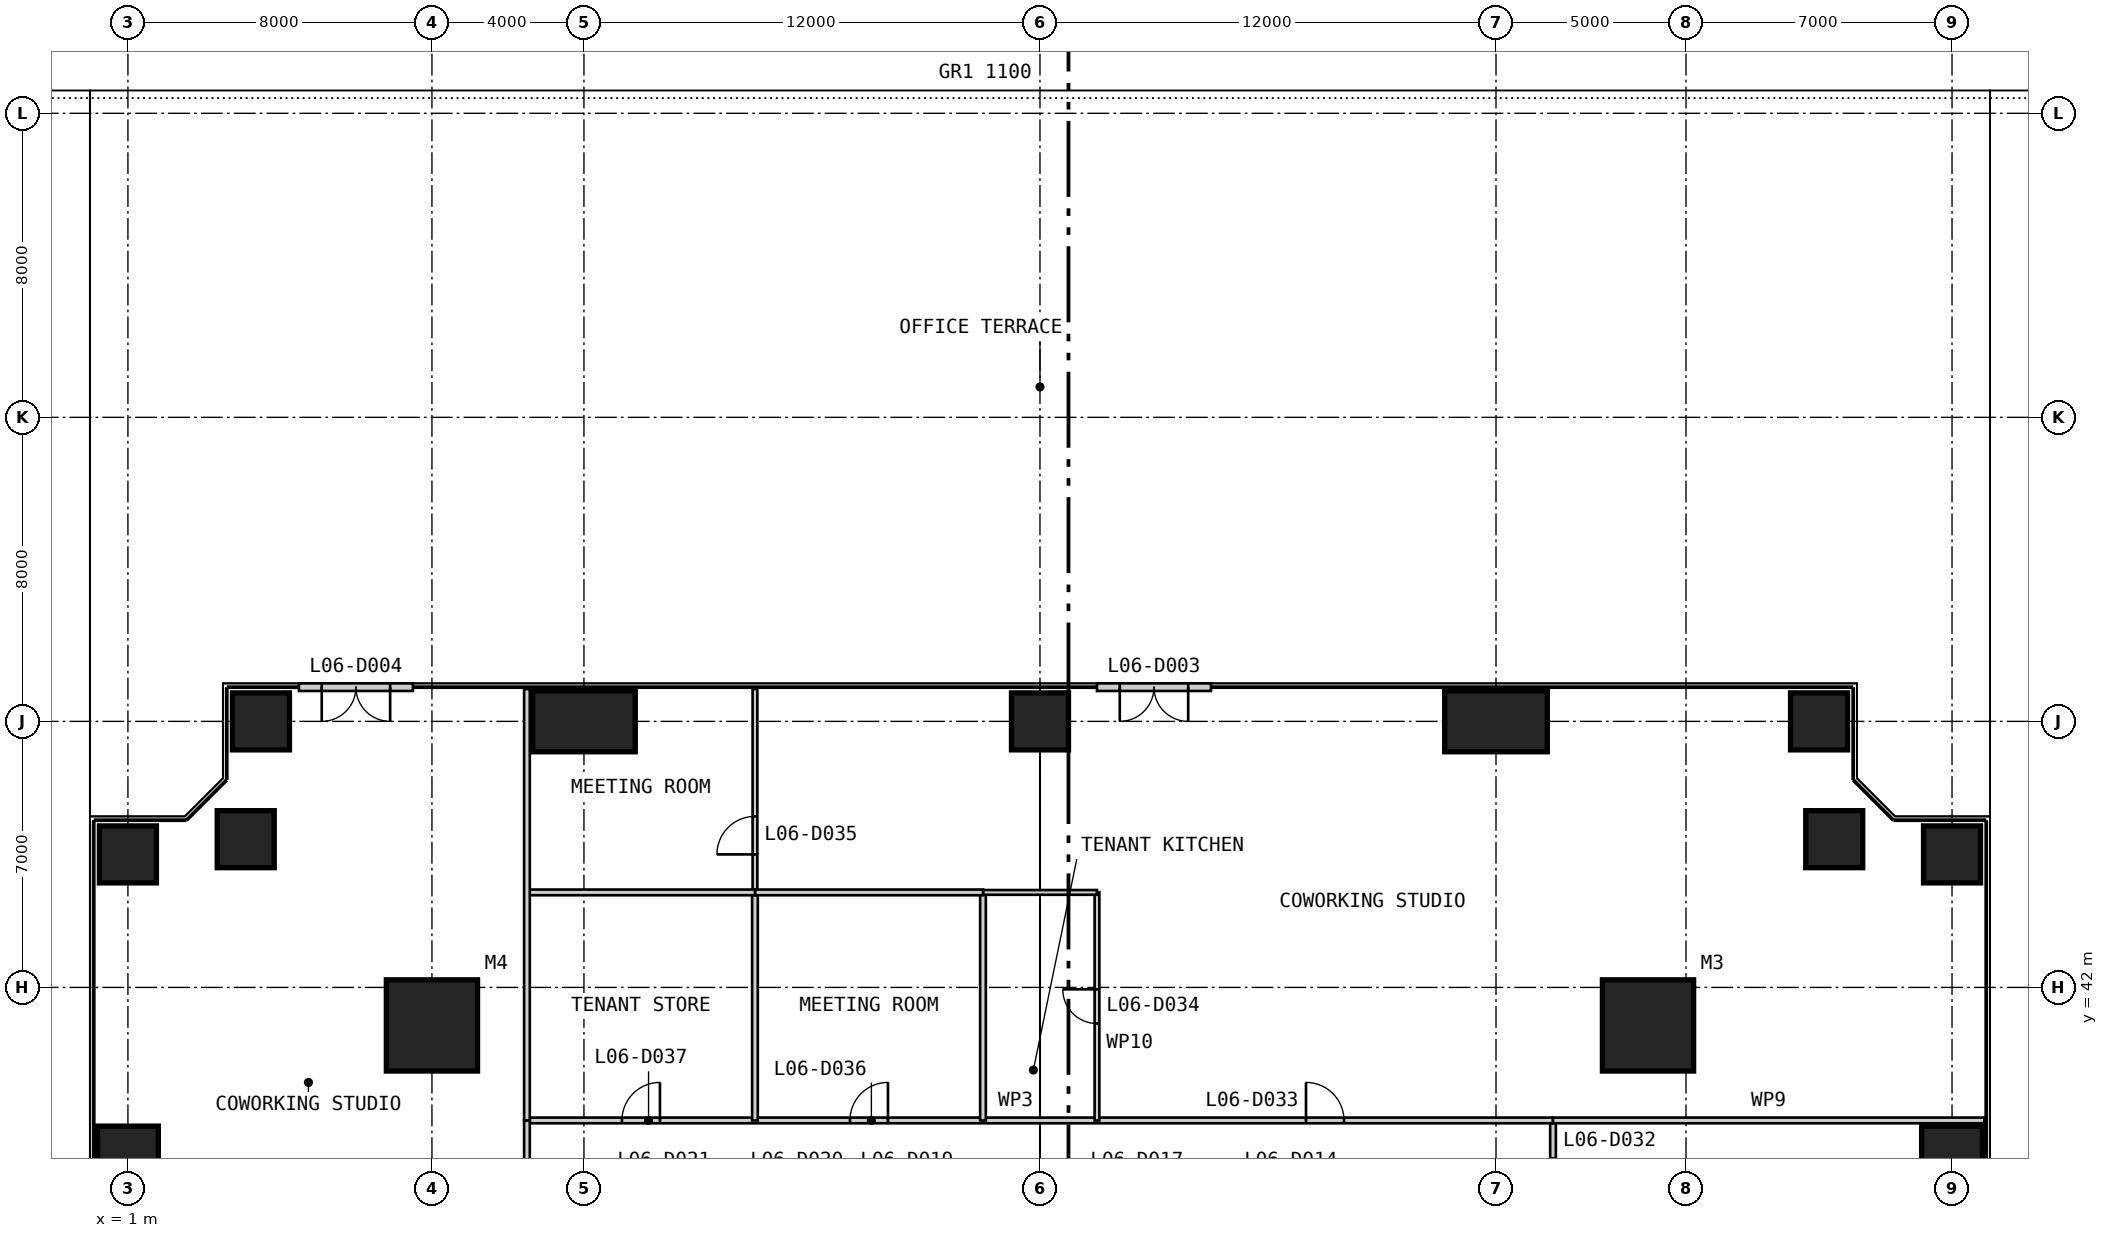
"""IFC4 building model, lengths in metres.
Left out: names, types, materials, properties, quantities, classifications, styles, units other than length and angle.
Written with IfcOpenShell. Run it as: python <this file> out.ifc"""

import sys

from ifc_helpers import new_model, si_unit, direction, frame, frame_2d, origin, origin_2d, place, context, subcontext, project, spatial, rectangle, extrude, element, fill, save


model = new_model("IFC4")
c1 = context("Model", 3, precision=1e-05, world=origin(), true_north=direction((0.0, 1.0)))
c2 = subcontext(c1, "Body", "Model", "MODEL_VIEW")
j1 = project(units=[si_unit("LENGTHUNIT", "METRE"), si_unit("PLANEANGLEUNIT", "RADIAN")], contexts=[c1])
p1 = place(None, origin())
s1 = spatial("IfcSite", under=j1, at=p1, CompositionType="ELEMENT")
p2 = place(p1, origin())
s2 = spatial("IfcBuilding", under=s1, at=p2, CompositionType="ELEMENT")
p3 = place(p2, frame((0.0, 0.0, 31.0)))
s3 = spatial("IfcBuildingStorey", under=s2, at=p3, CompositionType="ELEMENT", Elevation=31.0)
for number, where, z_axis, x_axis in (
    (1, (41.0, 41.0, 0.0), (0.0, 0.0, 1.0), (1.0, 0.0, 0.0)),
    (2, (9.0, 41.0, 0.0), (0.0, 0.0, 1.0), (1.0, 0.0, 0.0)),
):
    element("IfcColumn", number, at=place(p3, frame(where, z_axis=z_axis, x_axis=x_axis)), inside=s3, PredefinedType="COLUMN", context=c2, shape_type="SweptSolid", body=[
        extrude(rectangle(XDim=2.4, YDim=2.4, at=origin_2d()), origin(), (0.0, 0.0, 1.0), 4.0),
    ])
p4 = place(p3, frame((49.0, 37.0, 0.0), z_axis=(0.0, 0.0, 1.0), x_axis=(1.0, 0.0, 0.0)))
e3 = element("IfcColumn", 3, at=p4, inside=s3, PredefinedType="COLUMN", context=c2, shape_type="SweptSolid", body=[
    extrude(rectangle(XDim=1.6, YDim=2.7, at=origin_2d()), origin(), (0.0, 0.0, 1.0), 4.0),
])
for number, where, z_axis, x_axis in (
    (4, (49.0, 45.5, 0.0), (0.0, 0.0, 1.0), (1.0, 0.0, 0.0)),
    (5, (45.9, 45.9, 0.0), (0.0, 0.0, 1.0), (1.0, 0.0, 0.0)),
    (6, (45.5, 49.0, 0.0), (0.0, 0.0, 1.0), (1.0, 0.0, 0.0)),
):
    element("IfcColumn", number, at=place(p3, frame(where, z_axis=z_axis, x_axis=x_axis)), inside=s3, PredefinedType="COLUMN", context=c2, shape_type="SweptSolid", body=[
        extrude(rectangle(XDim=1.5, YDim=1.5, at=origin_2d()), origin(), (0.0, 0.0, 1.0), 4.0),
    ])
p5 = place(p3, frame((37.0, 49.0, 0.0), z_axis=(0.0, 0.0, 1.0), x_axis=(1.0, 0.0, 0.0)))
e7 = element("IfcColumn", 7, at=p5, inside=s3, PredefinedType="COLUMN", context=c2, shape_type="SweptSolid", body=[
    extrude(rectangle(XDim=2.7, YDim=1.6, at=origin_2d()), origin(), (0.0, 0.0, 1.0), 4.0),
])
p6 = place(p3, frame((25.0, 49.0, 0.0), z_axis=(0.0, 0.0, 1.0), x_axis=(1.0, 0.0, 0.0)))
e8 = element("IfcColumn", 8, at=p6, inside=s3, PredefinedType="COLUMN", context=c2, shape_type="SweptSolid", body=[
    extrude(rectangle(XDim=1.5, YDim=1.5, at=origin_2d()), origin(), (0.0, 0.0, 1.0), 4.0),
])
p7 = place(p3, frame((13.0, 49.0, 0.0), z_axis=(0.0, 0.0, 1.0), x_axis=(1.0, 0.0, 0.0)))
e9 = element("IfcColumn", 9, at=p7, inside=s3, PredefinedType="COLUMN", context=c2, shape_type="SweptSolid", body=[
    extrude(rectangle(XDim=2.7, YDim=1.6, at=origin_2d()), origin(), (0.0, 0.0, 1.0), 4.0),
])
for number, where, z_axis, x_axis in (
    (10, (4.5, 49.0, 0.0), (0.0, 0.0, 1.0), (1.0, 0.0, 0.0)),
    (11, (4.1, 45.9, 0.0), (0.0, 0.0, 1.0), (1.0, 0.0, 0.0)),
    (12, (1.0, 45.5, 0.0), (0.0, 0.0, 1.0), (1.0, 0.0, 0.0)),
):
    element("IfcColumn", number, at=place(p3, frame(where, z_axis=z_axis, x_axis=x_axis)), inside=s3, PredefinedType="COLUMN", context=c2, shape_type="SweptSolid", body=[
        extrude(rectangle(XDim=1.5, YDim=1.5, at=origin_2d()), origin(), (0.0, 0.0, 1.0), 4.0),
    ])
p8 = place(p3, frame((1.0, 37.0, 0.0), z_axis=(0.0, 0.0, 1.0), x_axis=(1.0, 0.0, 0.0)))
e13 = element("IfcColumn", 13, at=p8, inside=s3, PredefinedType="COLUMN", context=c2, shape_type="SweptSolid", body=[
    extrude(rectangle(XDim=1.6, YDim=2.7, at=origin_2d()), origin(), (0.0, 0.0, 1.0), 4.0),
])
p9 = place(p3, frame((29.5, 49.9, 0.0), z_axis=(0.0, 0.0, 1.0), x_axis=(-1.0, 0.0, 0.0)))
e14 = element("IfcWall", 14, at=p9, inside=s3, PredefinedType="SOLIDWALL", context=c2, shape_type="SweptSolid", body=[
    extrude(rectangle(XDim=3.0, YDim=0.2, at=frame_2d((1.5, 0.0))), origin(), (0.0, 0.0, 1.0), 3.85),
])
p10 = place(p9, frame((0.6, 0.0, 0.0)))
e15 = element("IfcOpeningElement", 15, at=p10, cuts=e14, PredefinedType="OPENING", context=c2, shape_type="SweptSolid", body=[
    extrude(rectangle(XDim=1.8, YDim=2.4, at=frame_2d((0.9, 1.2))), frame((0.0, 0.11, 0.0), z_axis=(0.0, -1.0, 0.0), x_axis=(1.0, 0.0, 0.0)), (0.0, 0.0, 1.0), 0.22),
])
p11 = place(p3, frame((8.5, 49.9, 0.0), z_axis=(0.0, 0.0, 1.0), x_axis=(-1.0, 0.0, 0.0)))
e16 = element("IfcWall", 16, at=p11, inside=s3, PredefinedType="SOLIDWALL", context=c2, shape_type="SweptSolid", body=[
    extrude(rectangle(XDim=3.0, YDim=0.2, at=frame_2d((1.5, 0.0))), origin(), (0.0, 0.0, 1.0), 3.85),
])
p12 = place(p11, frame((0.6, 0.0, 0.0)))
e17 = element("IfcOpeningElement", 17, at=p12, cuts=e16, PredefinedType="OPENING", context=c2, shape_type="SweptSolid", body=[
    extrude(rectangle(XDim=1.8, YDim=2.4, at=frame_2d((0.9, 1.2))), frame((0.0, 0.11, 0.0), z_axis=(0.0, -1.0, 0.0), x_axis=(1.0, 0.0, 0.0)), (0.0, 0.0, 1.0), 0.22),
])
p13 = place(p3, frame((38.5, 11.5, 0.0), z_axis=(0.0, 0.0, 1.0), x_axis=(0.0, 1.0, 0.0)))
e18 = element("IfcWall", 18, at=p13, inside=s3, PredefinedType="PARTITIONING", context=c2, shape_type="SweptSolid", body=[
    extrude(rectangle(XDim=27.0, YDim=0.15, at=frame_2d((13.5, 0.0))), origin(), (0.0, 0.0, 1.0), 3.85),
])
p14 = place(p13, frame((2.5, 0.0, 0.0)))
e19 = element("IfcOpeningElement", 19, at=p14, cuts=e18, PredefinedType="OPENING", context=c2, shape_type="SweptSolid", body=[
    extrude(rectangle(XDim=1.0, YDim=2.2, at=frame_2d((0.5, 1.1))), frame((0.0, 0.085, 0.0), z_axis=(0.0, -1.0, 0.0), x_axis=(1.0, 0.0, 0.0)), (0.0, 0.0, 1.0), 0.17),
])
p15 = place(p13, frame((11.5, 0.0, 0.0)))
e20 = element("IfcOpeningElement", 20, at=p15, cuts=e18, PredefinedType="OPENING", context=c2, shape_type="SweptSolid", body=[
    extrude(rectangle(XDim=1.0, YDim=2.2, at=frame_2d((0.5, 1.1))), frame((0.0, 0.085, 0.0), z_axis=(0.0, -1.0, 0.0), x_axis=(1.0, 0.0, 0.0)), (0.0, 0.0, 1.0), 0.17),
])
p16 = place(p13, frame((17.5, 0.0, 0.0)))
e21 = element("IfcOpeningElement", 21, at=p16, cuts=e18, PredefinedType="OPENING", context=c2, shape_type="SweptSolid", body=[
    extrude(rectangle(XDim=1.0, YDim=2.2, at=frame_2d((0.5, 1.1))), frame((0.0, 0.085, 0.0), z_axis=(0.0, -1.0, 0.0), x_axis=(1.0, 0.0, 0.0)), (0.0, 0.0, 1.0), 0.17),
])
p17 = place(p13, frame((22.0, 0.0, 0.0)))
e22 = element("IfcOpeningElement", 22, at=p17, cuts=e18, PredefinedType="OPENING", context=c2, shape_type="SweptSolid", body=[
    extrude(rectangle(XDim=1.0, YDim=2.2, at=frame_2d((0.5, 1.1))), frame((0.0, 0.085, 0.0), z_axis=(0.0, -1.0, 0.0), x_axis=(1.0, 0.0, 0.0)), (0.0, 0.0, 1.0), 0.17),
])
p18 = place(p13, frame((25.0, 0.0, 0.0)))
e23 = element("IfcOpeningElement", 23, at=p18, cuts=e18, PredefinedType="OPENING", context=c2, shape_type="SweptSolid", body=[
    extrude(rectangle(XDim=1.0, YDim=2.2, at=frame_2d((0.5, 1.1))), frame((0.0, 0.085, 0.0), z_axis=(0.0, -1.0, 0.0), x_axis=(1.0, 0.0, 0.0)), (0.0, 0.0, 1.0), 0.17),
])
p19 = place(p3, frame((38.5, 38.5, 0.0), z_axis=(0.0, 0.0, 1.0), x_axis=(-1.0, 0.0, 0.0)))
e24 = element("IfcWall", 24, at=p19, inside=s3, PredefinedType="PARTITIONING", context=c2, shape_type="SweptSolid", body=[
    extrude(rectangle(XDim=27.0, YDim=0.15, at=frame_2d((13.5, 0.0))), origin(), (0.0, 0.0, 1.0), 3.85),
])
p20 = place(p19, frame((5.5, 0.0, 0.0)))
e25 = element("IfcOpeningElement", 25, at=p20, cuts=e24, PredefinedType="OPENING", context=c2, shape_type="SweptSolid", body=[
    extrude(rectangle(XDim=1.0, YDim=2.2, at=frame_2d((0.5, 1.1))), frame((0.0, 0.085, 0.0), z_axis=(0.0, -1.0, 0.0), x_axis=(1.0, 0.0, 0.0)), (0.0, 0.0, 1.0), 0.17),
])
p21 = place(p19, frame((17.5, 0.0, 0.0)))
e26 = element("IfcOpeningElement", 26, at=p21, cuts=e24, PredefinedType="OPENING", context=c2, shape_type="SweptSolid", body=[
    extrude(rectangle(XDim=1.0, YDim=2.2, at=frame_2d((0.5, 1.1))), frame((0.0, 0.085, 0.0), z_axis=(0.0, -1.0, 0.0), x_axis=(1.0, 0.0, 0.0)), (0.0, 0.0, 1.0), 0.17),
])
p22 = place(p19, frame((23.5, 0.0, 0.0)))
e27 = element("IfcOpeningElement", 27, at=p22, cuts=e24, PredefinedType="OPENING", context=c2, shape_type="SweptSolid", body=[
    extrude(rectangle(XDim=1.0, YDim=2.2, at=frame_2d((0.5, 1.1))), frame((0.0, 0.085, 0.0), z_axis=(0.0, -1.0, 0.0), x_axis=(1.0, 0.0, 0.0)), (0.0, 0.0, 1.0), 0.17),
])
p23 = place(p3, frame((49.85, 38.5, 0.0), z_axis=(0.0, 0.0, 1.0), x_axis=(-1.0, 0.0, 0.0)))
e28 = element("IfcWall", 28, at=p23, inside=s3, PredefinedType="PARTITIONING", context=c2, shape_type="SweptSolid", body=[
    extrude(rectangle(XDim=11.35, YDim=0.15, at=frame_2d((5.675, 0.0))), origin(), (0.0, 0.0, 1.0), 3.85),
])
p24 = place(p3, frame((26.5, 44.5, 0.0), z_axis=(0.0, 0.0, 1.0), x_axis=(0.0, -1.0, 0.0)))
e29 = element("IfcWall", 29, at=p24, inside=s3, PredefinedType="PARTITIONING", context=c2, shape_type="SweptSolid", body=[
    extrude(rectangle(XDim=6.0, YDim=0.125, at=frame_2d((3.0, 0.0))), origin(), (0.0, 0.0, 1.0), 3.85),
])
p25 = place(p24, frame((2.55, 0.0, 0.0)))
e30 = element("IfcOpeningElement", 30, at=p25, cuts=e29, PredefinedType="OPENING", context=c2, shape_type="SweptSolid", body=[
    extrude(rectangle(XDim=0.9, YDim=2.2, at=frame_2d((0.45, 1.1))), frame((0.0, 0.073, 0.0), z_axis=(0.0, -1.0, 0.0), x_axis=(1.0, 0.0, 0.0)), (0.0, 0.0, 1.0), 0.145),
])
p26 = place(p3, frame((23.5, 44.5, 0.0), z_axis=(0.0, 0.0, 1.0), x_axis=(0.0, -1.0, 0.0)))
e31 = element("IfcWall", 31, at=p26, inside=s3, PredefinedType="PARTITIONING", context=c2, shape_type="SweptSolid", body=[
    extrude(rectangle(XDim=6.0, YDim=0.15, at=frame_2d((3.0, 0.0))), origin(), (0.0, 0.0, 1.0), 3.85),
])
p27 = place(p3, frame((17.5, 49.85, 0.0), z_axis=(0.0, 0.0, 1.0), x_axis=(0.0, -1.0, 0.0)))
e32 = element("IfcWall", 32, at=p27, inside=s3, PredefinedType="PARTITIONING", context=c2, shape_type="SweptSolid", body=[
    extrude(rectangle(XDim=5.35, YDim=0.125, at=frame_2d((2.675, 0.0))), origin(), (0.0, 0.0, 1.0), 3.85),
])
p28 = place(p27, frame((3.35, 0.0, 0.0)))
e33 = element("IfcOpeningElement", 33, at=p28, cuts=e32, PredefinedType="OPENING", context=c2, shape_type="SweptSolid", body=[
    extrude(rectangle(XDim=1.0, YDim=2.2, at=frame_2d((0.5, 1.1))), frame((0.0, 0.073, 0.0), z_axis=(0.0, -1.0, 0.0), x_axis=(1.0, 0.0, 0.0)), (0.0, 0.0, 1.0), 0.145),
])
p29 = place(p3, frame((17.5, 44.5, 0.0), z_axis=(0.0, 0.0, 1.0), x_axis=(0.0, -1.0, 0.0)))
e34 = element("IfcWall", 34, at=p29, inside=s3, PredefinedType="PARTITIONING", context=c2, shape_type="SweptSolid", body=[
    extrude(rectangle(XDim=6.0, YDim=0.15, at=frame_2d((3.0, 0.0))), origin(), (0.0, 0.0, 1.0), 3.85),
])
p30 = place(p3, frame((26.5, 44.5, 0.0), z_axis=(0.0, 0.0, 1.0), x_axis=(-1.0, 0.0, 0.0)))
e35 = element("IfcWall", 35, at=p30, inside=s3, PredefinedType="PARTITIONING", context=c2, shape_type="SweptSolid", body=[
    extrude(rectangle(XDim=3.0, YDim=0.125, at=frame_2d((1.5, 0.0))), origin(), (0.0, 0.0, 1.0), 3.85),
])
for number, where, z_axis, x_axis in (
    (36, (23.5, 44.5, 0.0), (0.0, 0.0, 1.0), (-1.0, 0.0, 0.0)),
    (37, (17.5, 44.5, 0.0), (0.0, 0.0, 1.0), (-1.0, 0.0, 0.0)),
):
    element("IfcWall", number, at=place(p3, frame(where, z_axis=z_axis, x_axis=x_axis)), inside=s3, PredefinedType="PARTITIONING", context=c2, shape_type="SweptSolid", body=[
        extrude(rectangle(XDim=6.0, YDim=0.15, at=frame_2d((3.0, 0.0))), origin(), (0.0, 0.0, 1.0), 3.85),
    ])
p31 = place(p3, frame((11.5, 38.5, 0.0), z_axis=(0.0, 0.0, 1.0), x_axis=(0.0, -1.0, 0.0)))
e38 = element("IfcWall", 38, at=p31, inside=s3, PredefinedType="PARTITIONING", context=c2, shape_type="SweptSolid", body=[
    extrude(rectangle(XDim=27.0, YDim=0.15, at=frame_2d((13.5, 0.0))), origin(), (0.0, 0.0, 1.0), 3.85),
])
p32 = place(p31, frame((2.5, 0.0, 0.0)))
e39 = element("IfcOpeningElement", 39, at=p32, cuts=e38, PredefinedType="OPENING", context=c2, shape_type="SweptSolid", body=[
    extrude(rectangle(XDim=1.0, YDim=2.2, at=frame_2d((0.5, 1.1))), frame((0.0, 0.085, 0.0), z_axis=(0.0, -1.0, 0.0), x_axis=(1.0, 0.0, 0.0)), (0.0, 0.0, 1.0), 0.17),
])
p33 = place(p31, frame((11.5, 0.0, 0.0)))
e40 = element("IfcOpeningElement", 40, at=p33, cuts=e38, PredefinedType="OPENING", context=c2, shape_type="SweptSolid", body=[
    extrude(rectangle(XDim=1.0, YDim=2.2, at=frame_2d((0.5, 1.1))), frame((0.0, 0.085, 0.0), z_axis=(0.0, -1.0, 0.0), x_axis=(1.0, 0.0, 0.0)), (0.0, 0.0, 1.0), 0.17),
])
p34 = place(p31, frame((17.5, 0.0, 0.0)))
e41 = element("IfcOpeningElement", 41, at=p34, cuts=e38, PredefinedType="OPENING", context=c2, shape_type="SweptSolid", body=[
    extrude(rectangle(XDim=1.0, YDim=2.2, at=frame_2d((0.5, 1.1))), frame((0.0, 0.085, 0.0), z_axis=(0.0, -1.0, 0.0), x_axis=(1.0, 0.0, 0.0)), (0.0, 0.0, 1.0), 0.17),
])
p35 = place(p31, frame((22.0, 0.0, 0.0)))
e42 = element("IfcOpeningElement", 42, at=p35, cuts=e38, PredefinedType="OPENING", context=c2, shape_type="SweptSolid", body=[
    extrude(rectangle(XDim=1.0, YDim=2.2, at=frame_2d((0.5, 1.1))), frame((0.0, 0.085, 0.0), z_axis=(0.0, -1.0, 0.0), x_axis=(1.0, 0.0, 0.0)), (0.0, 0.0, 1.0), 0.17),
])
p36 = place(p31, frame((25.0, 0.0, 0.0)))
e43 = element("IfcOpeningElement", 43, at=p36, cuts=e38, PredefinedType="OPENING", context=c2, shape_type="SweptSolid", body=[
    extrude(rectangle(XDim=1.0, YDim=2.2, at=frame_2d((0.5, 1.1))), frame((0.0, 0.085, 0.0), z_axis=(0.0, -1.0, 0.0), x_axis=(1.0, 0.0, 0.0)), (0.0, 0.0, 1.0), 0.17),
])
p37 = place(p3, frame((11.5, 49.85, 0.0), z_axis=(0.0, 0.0, 1.0), x_axis=(0.0, -1.0, 0.0)))
e44 = element("IfcWall", 44, at=p37, inside=s3, PredefinedType="PARTITIONING", context=c2, shape_type="SweptSolid", body=[
    extrude(rectangle(XDim=11.35, YDim=0.15, at=frame_2d((5.675, 0.0))), origin(), (0.0, 0.0, 1.0), 3.85),
])
p38 = place(p10, origin())
e45 = element("IfcDoor", 45, at=p38, inside=s3, OperationType="DOUBLE_DOOR_SINGLE_SWING", PredefinedType="DOOR", context=c2, shape_type="SweptSolid", body=[
    extrude(rectangle(XDim=1.8, YDim=2.4, at=frame_2d((0.9, 1.2))), frame((0.0, 0.025, 0.0), z_axis=(0.0, -1.0, 0.0), x_axis=(1.0, 0.0, 0.0)), (0.0, 0.0, 1.0), 0.05),
])
fill(e15, e45)
p39 = place(p12, origin())
e46 = element("IfcDoor", 46, at=p39, inside=s3, OperationType="DOUBLE_DOOR_SINGLE_SWING", PredefinedType="DOOR", context=c2, shape_type="SweptSolid", body=[
    extrude(rectangle(XDim=1.8, YDim=2.4, at=frame_2d((0.9, 1.2))), frame((0.0, 0.025, 0.0), z_axis=(0.0, -1.0, 0.0), x_axis=(1.0, 0.0, 0.0)), (0.0, 0.0, 1.0), 0.05),
])
fill(e17, e46)
p40 = place(p20, frame((1.0, 0.0, 0.0), z_axis=(0.0, 0.0, 1.0), x_axis=(-1.0, 0.0, 0.0)))
e47 = element("IfcDoor", 47, at=p40, inside=s3, OperationType="SINGLE_SWING_LEFT", PredefinedType="DOOR", context=c2, shape_type="SweptSolid", body=[
    extrude(rectangle(XDim=1.0, YDim=2.2, at=frame_2d((0.5, 1.1))), frame((0.0, 0.025, 0.0), z_axis=(0.0, -1.0, 0.0), x_axis=(1.0, 0.0, 0.0)), (0.0, 0.0, 1.0), 0.05),
])
fill(e25, e47)
p41 = place(p25, frame((0.9, 0.0, 0.0), z_axis=(0.0, 0.0, 1.0), x_axis=(-1.0, 0.0, 0.0)))
e48 = element("IfcDoor", 48, at=p41, inside=s3, OperationType="SINGLE_SWING_RIGHT", PredefinedType="DOOR", context=c2, shape_type="SweptSolid", body=[
    extrude(rectangle(XDim=0.9, YDim=2.2, at=frame_2d((0.45, 1.1))), frame((0.0, 0.025, 0.0), z_axis=(0.0, -1.0, 0.0), x_axis=(1.0, 0.0, 0.0)), (0.0, 0.0, 1.0), 0.05),
])
fill(e30, e48)
p42 = place(p28, frame((1.0, 0.0, 0.0), z_axis=(0.0, 0.0, 1.0), x_axis=(-1.0, 0.0, 0.0)))
e49 = element("IfcDoor", 49, at=p42, inside=s3, OperationType="SINGLE_SWING_LEFT", PredefinedType="DOOR", context=c2, shape_type="SweptSolid", body=[
    extrude(rectangle(XDim=1.0, YDim=2.2, at=frame_2d((0.5, 1.1))), frame((0.0, 0.025, 0.0), z_axis=(0.0, -1.0, 0.0), x_axis=(1.0, 0.0, 0.0)), (0.0, 0.0, 1.0), 0.05),
])
fill(e33, e49)
p43 = place(p21, frame((1.0, 0.0, 0.0), z_axis=(0.0, 0.0, 1.0), x_axis=(-1.0, 0.0, 0.0)))
e50 = element("IfcDoor", 50, at=p43, inside=s3, OperationType="SINGLE_SWING_RIGHT", PredefinedType="DOOR", context=c2, shape_type="SweptSolid", body=[
    extrude(rectangle(XDim=1.0, YDim=2.2, at=frame_2d((0.5, 1.1))), frame((0.0, 0.025, 0.0), z_axis=(0.0, -1.0, 0.0), x_axis=(1.0, 0.0, 0.0)), (0.0, 0.0, 1.0), 0.05),
])
fill(e26, e50)
p44 = place(p22, frame((1.0, 0.0, 0.0), z_axis=(0.0, 0.0, 1.0), x_axis=(-1.0, 0.0, 0.0)))
e51 = element("IfcDoor", 51, at=p44, inside=s3, OperationType="SINGLE_SWING_RIGHT", PredefinedType="DOOR", context=c2, shape_type="SweptSolid", body=[
    extrude(rectangle(XDim=1.0, YDim=2.2, at=frame_2d((0.5, 1.1))), frame((0.0, 0.025, 0.0), z_axis=(0.0, -1.0, 0.0), x_axis=(1.0, 0.0, 0.0)), (0.0, 0.0, 1.0), 0.05),
])
fill(e27, e51)
save(model, sys.argv[1])
